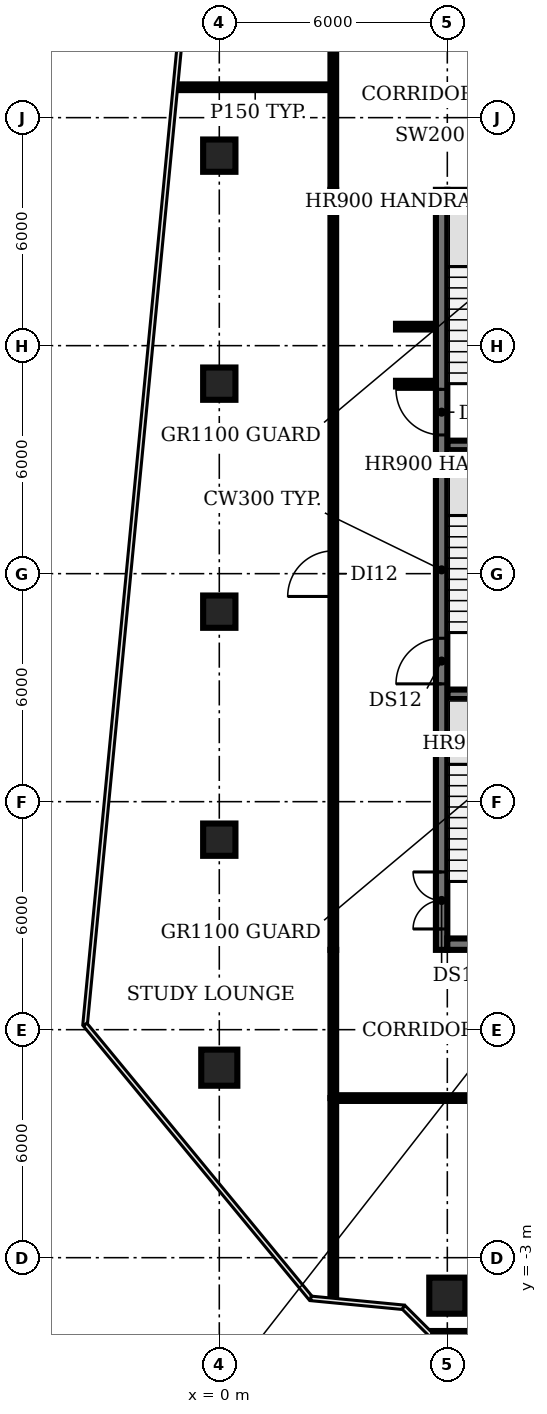
"""IFC4 building model, lengths in metres.
Left out: names, types, materials, properties, quantities, classifications, styles, units other than length and angle.
Written with IfcOpenShell. Run it as: python <this file> out.ifc"""

import sys

from ifc_helpers import new_model, si_unit, direction, frame, frame_2d, origin, origin_2d, place, context, subcontext, project, spatial, rectangle, circle, extrude, element, fill, save


model = new_model("IFC4")
c1 = context("Model", 3, precision=1e-05, world=origin(), true_north=direction((0.0, 1.0)))
c2 = subcontext(c1, "Body", "Model", "MODEL_VIEW")
j1 = project(units=[si_unit("LENGTHUNIT", "METRE"), si_unit("PLANEANGLEUNIT", "RADIAN")], contexts=[c1])
p1 = place(None, origin())
s1 = spatial("IfcSite", under=j1, at=p1, CompositionType="ELEMENT")
p2 = place(p1, origin())
s2 = spatial("IfcBuilding", under=s1, at=p2, CompositionType="ELEMENT")
p3 = place(p2, frame((0.0, 0.0, 264.2)))
s3 = spatial("IfcBuildingStorey", under=s2, at=p3, CompositionType="ELEMENT", Elevation=264.2)
p4 = place(p3, frame((0.0, 2.0, -0.35), z_axis=(0.0, 0.0, 1.0), x_axis=(1.0, 0.0, 0.0)))
e1 = element("IfcColumn", 1, at=p4, inside=s3, PredefinedType="COLUMN", context=c2, shape_type="SweptSolid", body=[
    extrude(circle(Radius=0.475, at=origin_2d()), origin(), (0.0, 0.0, 1.0), 4.2),
])
for number, where, z_axis, x_axis in (
    (2, (0.0, 8.0, -0.35), (0.0, 0.0, 1.0), (1.0, 0.0, 0.0)),
    (3, (0.0, 14.0, -0.35), (0.0, 0.0, 1.0), (1.0, 0.0, 0.0)),
    (4, (0.0, 20.0, -0.35), (0.0, 0.0, 1.0), (1.0, 0.0, 0.0)),
    (5, (0.0, 26.0, -0.35), (0.0, 0.0, 1.0), (1.0, 0.0, 0.0)),
):
    element("IfcColumn", number, at=place(p3, frame(where, z_axis=z_axis, x_axis=x_axis)), inside=s3, PredefinedType="COLUMN", context=c2, shape_type="SweptSolid", body=[
        extrude(rectangle(XDim=0.85, YDim=0.85, at=origin_2d()), origin(), (0.0, 0.0, 1.0), 4.2),
    ])
p5 = place(p3, frame((6.0, -4.0, -0.35), z_axis=(0.0, 0.0, 1.0), x_axis=(1.0, 0.0, 0.0)))
e6 = element("IfcColumn", 6, at=p5, inside=s3, PredefinedType="COLUMN", context=c2, shape_type="SweptSolid", body=[
    extrude(circle(Radius=0.475, at=origin_2d()), origin(), (0.0, 0.0, 1.0), 4.2),
])
p6 = place(p3, frame((5.573, -5.08, 0.0), z_axis=(0.0, 0.0, 1.0), x_axis=(1.0, 0.0, 0.0)))
e7 = element("IfcWall", 7, at=p6, inside=s3, PredefinedType="SOLIDWALL", context=c2, shape_type="SweptSolid", body=[
    extrude(rectangle(XDim=8.527, YDim=0.3, at=frame_2d((4.263, 0.0))), origin(), (0.0, 0.0, 1.0), 3.85),
])
for number, where, z_axis, x_axis in (
    (8, (6.0, 11.825, 0.0), (0.0, 0.0, 1.0), (1.0, 0.0, 0.0)),
    (9, (6.0, 18.375, 0.0), (0.0, 0.0, 1.0), (1.0, 0.0, 0.0)),
):
    element("IfcWall", number, at=place(p3, frame(where, z_axis=z_axis, x_axis=x_axis)), inside=s3, PredefinedType="SHEAR", context=c2, shape_type="SweptSolid", body=[
        extrude(rectangle(XDim=3.15, YDim=0.25, at=frame_2d((1.575, 0.0))), origin(), (0.0, 0.0, 1.0), 3.85),
    ])
p7 = place(p3, frame((5.85, 5.1, 0.0), z_axis=(0.0, 0.0, 1.0), x_axis=(0.0, 1.0, 0.0)))
e10 = element("IfcWall", 10, at=p7, inside=s3, PredefinedType="SHEAR", context=c2, shape_type="SweptSolid", body=[
    extrude(rectangle(XDim=20.0, YDim=0.3, at=frame_2d((10.0, 0.0))), origin(), (0.0, 0.0, 1.0), 3.85),
])
p8 = place(p7, frame((0.55, 0.0, 0.0)))
e11 = element("IfcOpeningElement", 11, at=p8, cuts=e10, PredefinedType="OPENING", context=c2, shape_type="SweptSolid", body=[
    extrude(rectangle(XDim=1.5, YDim=2.1, at=frame_2d((0.75, 1.05))), frame((0.0, 0.16, 0.0), z_axis=(0.0, -1.0, 0.0), x_axis=(1.0, 0.0, 0.0)), (0.0, 0.0, 1.0), 0.32),
])
p9 = place(p7, frame((7.0, 0.0, 0.0)))
e12 = element("IfcOpeningElement", 12, at=p9, cuts=e10, PredefinedType="OPENING", context=c2, shape_type="SweptSolid", body=[
    extrude(rectangle(XDim=1.2, YDim=2.1, at=frame_2d((0.6, 1.05))), frame((0.0, 0.16, 0.0), z_axis=(0.0, -1.0, 0.0), x_axis=(1.0, 0.0, 0.0)), (0.0, 0.0, 1.0), 0.32),
])
p10 = place(p7, frame((13.55, 0.0, 0.0)))
e13 = element("IfcOpeningElement", 13, at=p10, cuts=e10, PredefinedType="OPENING", context=c2, shape_type="SweptSolid", body=[
    extrude(rectangle(XDim=1.2, YDim=2.1, at=frame_2d((0.6, 1.05))), frame((0.0, 0.16, 0.0), z_axis=(0.0, -1.0, 0.0), x_axis=(1.0, 0.0, 0.0)), (0.0, 0.0, 1.0), 0.32),
])
p11 = place(p3, frame((24.0, 5.25, 0.0), z_axis=(0.0, 0.0, 1.0), x_axis=(-1.0, 0.0, 0.0)))
e14 = element("IfcWall", 14, at=p11, inside=s3, PredefinedType="SHEAR", context=c2, shape_type="SweptSolid", body=[
    extrude(rectangle(XDim=18.0, YDim=0.3, at=frame_2d((9.0, 0.0))), origin(), (0.0, 0.0, 1.0), 3.85),
])
p12 = place(p11, frame((13.0, 0.0, 0.0)))
e15 = element("IfcOpeningElement", 15, at=p12, cuts=e14, PredefinedType="OPENING", context=c2, shape_type="SweptSolid", body=[
    extrude(rectangle(XDim=1.2, YDim=2.1, at=frame_2d((0.6, 1.05))), frame((0.0, 0.16, 0.0), z_axis=(0.0, -1.0, 0.0), x_axis=(1.0, 0.0, 0.0)), (0.0, 0.0, 1.0), 0.32),
])
p13 = place(p11, frame((4.9, 0.0, 0.0)))
e16 = element("IfcOpeningElement", 16, at=p13, cuts=e14, PredefinedType="OPENING", context=c2, shape_type="SweptSolid", body=[
    extrude(rectangle(XDim=1.0, YDim=2.1, at=frame_2d((0.5, 1.05))), frame((0.0, 0.16, 0.0), z_axis=(0.0, -1.0, 0.0), x_axis=(1.0, 0.0, 0.0)), (0.0, 0.0, 1.0), 0.32),
])
p14 = place(p3, frame((6.0, 24.95, 0.0), z_axis=(0.0, 0.0, 1.0), x_axis=(1.0, 0.0, 0.0)))
e17 = element("IfcWall", 17, at=p14, inside=s3, PredefinedType="SHEAR", context=c2, shape_type="SweptSolid", body=[
    extrude(rectangle(XDim=18.0, YDim=0.3, at=frame_2d((9.0, 0.0))), origin(), (0.0, 0.0, 1.0), 3.85),
])
p15 = place(p3, frame((-1.11, 27.8, 0.0), z_axis=(0.0, 0.0, 1.0), x_axis=(1.0, 0.0, 0.0)))
e18 = element("IfcWall", 18, at=p15, inside=s3, PredefinedType="PARTITIONING", context=c2, shape_type="SweptSolid", body=[
    extrude(rectangle(XDim=4.11, YDim=0.15, at=frame_2d((2.055, 0.0))), origin(), (0.0, 0.0, 1.0), 2.9),
])
p16 = place(p3, frame((3.0, -4.08, 0.0), z_axis=(0.0, 0.0, 1.0), x_axis=(0.0, 1.0, 0.0)))
e19 = element("IfcWall", 19, at=p16, inside=s3, PredefinedType="PARTITIONING", context=c2, shape_type="SweptSolid", body=[
    extrude(rectangle(XDim=5.28, YDim=0.15, at=frame_2d((2.64, 0.0))), origin(), (0.0, 0.0, 1.0), 2.9),
])
p17 = place(p3, frame((3.0, 1.2, 0.0), z_axis=(0.0, 0.0, 1.0), x_axis=(0.0, 1.0, 0.0)))
e20 = element("IfcWall", 20, at=p17, inside=s3, PredefinedType="PARTITIONING", context=c2, shape_type="SweptSolid", body=[
    extrude(rectangle(XDim=3.9, YDim=0.15, at=frame_2d((1.95, 0.0))), origin(), (0.0, 0.0, 1.0), 2.9),
])
p18 = place(p3, frame((3.0, 5.1, 0.0), z_axis=(0.0, 0.0, 1.0), x_axis=(0.0, 1.0, 0.0)))
e21 = element("IfcWall", 21, at=p18, inside=s3, PredefinedType="PARTITIONING", context=c2, shape_type="SweptSolid", body=[
    extrude(rectangle(XDim=20.0, YDim=0.15, at=frame_2d((10.0, 0.0))), origin(), (0.0, 0.0, 1.0), 2.9),
])
p19 = place(p18, frame((9.3, 0.0, 0.0)))
e22 = element("IfcOpeningElement", 22, at=p19, cuts=e21, PredefinedType="OPENING", context=c2, shape_type="SweptSolid", body=[
    extrude(rectangle(XDim=1.2, YDim=2.1, at=frame_2d((0.6, 1.05))), frame((0.0, 0.085, 0.0), z_axis=(0.0, -1.0, 0.0), x_axis=(1.0, 0.0, 0.0)), (0.0, 0.0, 1.0), 0.17),
])
p20 = place(p3, frame((3.0, 25.1, 0.0), z_axis=(0.0, 0.0, 1.0), x_axis=(0.0, 1.0, 0.0)))
e23 = element("IfcWall", 23, at=p20, inside=s3, PredefinedType="PARTITIONING", context=c2, shape_type="SweptSolid", body=[
    extrude(rectangle(XDim=3.9, YDim=0.15, at=frame_2d((1.95, 0.0))), origin(), (0.0, 0.0, 1.0), 2.9),
])
for number, where, z_axis, x_axis in (
    (24, (4.65, 20.0, 0.0), (0.0, 0.0, 1.0), (1.0, 0.0, 0.0)),
    (25, (4.65, 21.5, 0.0), (0.0, 0.0, 1.0), (1.0, 0.0, 0.0)),
):
    element("IfcWall", number, at=place(p3, frame(where, z_axis=z_axis, x_axis=x_axis)), inside=s3, PredefinedType="PARTITIONING", context=c2, shape_type="SweptSolid", body=[
        extrude(rectangle(XDim=1.05, YDim=0.15, at=frame_2d((0.525, 0.0))), origin(), (0.0, 0.0, 1.0), 2.9),
    ])
p21 = place(p3, frame((27.0, 1.2, 0.0), z_axis=(0.0, 0.0, 1.0), x_axis=(-1.0, 0.0, 0.0)))
e26 = element("IfcWall", 26, at=p21, inside=s3, PredefinedType="PARTITIONING", context=c2, shape_type="SweptSolid", body=[
    extrude(rectangle(XDim=24.0, YDim=0.15, at=frame_2d((12.0, 0.0))), origin(), (0.0, 0.0, 1.0), 2.9),
])
p22 = place(p21, frame((11.5, 0.0, 0.0)))
e27 = element("IfcOpeningElement", 27, at=p22, cuts=e26, PredefinedType="OPENING", context=c2, shape_type="SweptSolid", body=[
    extrude(rectangle(XDim=1.2, YDim=2.1, at=frame_2d((0.6, 1.05))), frame((0.0, 0.085, 0.0), z_axis=(0.0, -1.0, 0.0), x_axis=(1.0, 0.0, 0.0)), (0.0, 0.0, 1.0), 0.17),
])
p23 = place(p8, origin())
e28 = element("IfcDoor", 28, at=p23, inside=s3, OperationType="DOUBLE_DOOR_SINGLE_SWING", PredefinedType="DOOR", context=c2, shape_type="SweptSolid", body=[
    extrude(rectangle(XDim=1.5, YDim=2.1, at=frame_2d((0.75, 1.05))), frame((0.0, 0.025, 0.0), z_axis=(0.0, -1.0, 0.0), x_axis=(1.0, 0.0, 0.0)), (0.0, 0.0, 1.0), 0.05),
])
fill(e11, e28)
p24 = place(p9, origin())
e29 = element("IfcDoor", 29, at=p24, inside=s3, OperationType="SINGLE_SWING_LEFT", PredefinedType="DOOR", context=c2, shape_type="SweptSolid", body=[
    extrude(rectangle(XDim=1.2, YDim=2.1, at=frame_2d((0.6, 1.05))), frame((0.0, 0.025, 0.0), z_axis=(0.0, -1.0, 0.0), x_axis=(1.0, 0.0, 0.0)), (0.0, 0.0, 1.0), 0.05),
])
fill(e12, e29)
p25 = place(p10, origin())
e30 = element("IfcDoor", 30, at=p25, inside=s3, OperationType="SINGLE_SWING_RIGHT", PredefinedType="DOOR", context=c2, shape_type="SweptSolid", body=[
    extrude(rectangle(XDim=1.2, YDim=2.1, at=frame_2d((0.6, 1.05))), frame((0.0, 0.025, 0.0), z_axis=(0.0, -1.0, 0.0), x_axis=(1.0, 0.0, 0.0)), (0.0, 0.0, 1.0), 0.05),
])
fill(e13, e30)
p26 = place(p19, origin())
e31 = element("IfcDoor", 31, at=p26, inside=s3, OperationType="SINGLE_SWING_LEFT", PredefinedType="DOOR", context=c2, shape_type="SweptSolid", body=[
    extrude(rectangle(XDim=1.2, YDim=2.1, at=frame_2d((0.6, 1.05))), frame((0.0, 0.025, 0.0), z_axis=(0.0, -1.0, 0.0), x_axis=(1.0, 0.0, 0.0)), (0.0, 0.0, 1.0), 0.05),
])
fill(e22, e31)
save(model, sys.argv[1])
